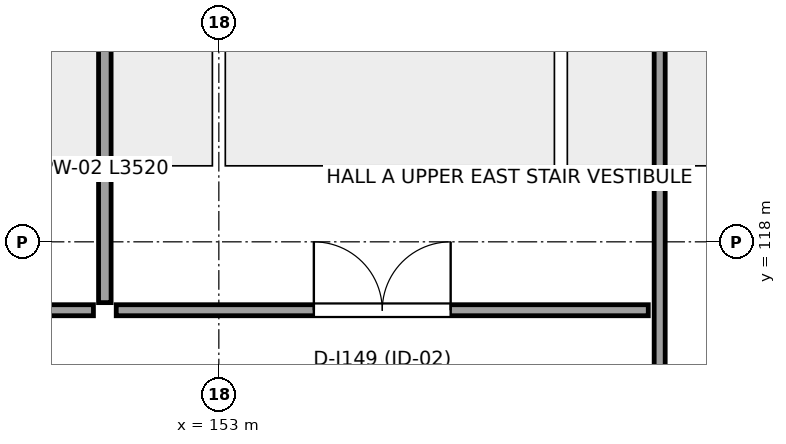
"""IFC4 building model, lengths in metres.
Left out: names, types, materials, properties, quantities, classifications, styles, units other than length and angle.
Written with IfcOpenShell. Run it as: python <this file> out.ifc"""

import sys

from ifc_helpers import new_model, si_unit, direction, frame, frame_2d, origin, place, context, subcontext, project, spatial, rectangle, extrude, element, fill, save


model = new_model("IFC4")
c1 = context("Model", 3, precision=1e-05, world=origin(), true_north=direction((0.0, 1.0)))
c2 = subcontext(c1, "Body", "Model", "MODEL_VIEW")
j1 = project(units=[si_unit("LENGTHUNIT", "METRE"), si_unit("PLANEANGLEUNIT", "RADIAN")], contexts=[c1])
p1 = place(None, origin())
s1 = spatial("IfcSite", under=j1, at=p1, CompositionType="ELEMENT")
p2 = place(p1, origin())
s2 = spatial("IfcBuilding", under=s1, at=p2, CompositionType="ELEMENT")
p3 = place(p2, frame((0.0, 0.0, 12.0)))
s3 = spatial("IfcBuildingStorey", under=s2, at=p3, CompositionType="ELEMENT", Elevation=12.0)
p4 = place(p3, frame((121.75, 117.1, 0.0), z_axis=(0.0, 0.0, 1.0), x_axis=(1.0, 0.0, 0.0)))
e1 = element("IfcWall", 1, at=p4, inside=s3, PredefinedType="PARTITIONING", context=c2, shape_type="SweptSolid", body=[
    extrude(rectangle(XDim=29.6, YDim=0.145, at=frame_2d((14.8, 0.0))), origin(), (0.0, 0.0, 1.0), 2.95),
])
p5 = place(p4, frame((2.5, 0.0, 0.0)))
e2 = element("IfcOpeningElement", 2, at=p5, cuts=e1, PredefinedType="OPENING", context=c2, shape_type="SweptSolid", body=[
    extrude(rectangle(XDim=0.98, YDim=2.15, at=frame_2d((0.49, 1.075))), frame((0.0, 0.083, 0.0), z_axis=(0.0, -1.0, 0.0), x_axis=(1.0, 0.0, 0.0)), (0.0, 0.0, 1.0), 0.165),
])
p6 = place(p3, frame((151.65, 117.1, 0.0), z_axis=(0.0, 0.0, 1.0), x_axis=(1.0, 0.0, 0.0)))
e3 = element("IfcWall", 3, at=p6, inside=s3, PredefinedType="PARTITIONING", context=c2, shape_type="SweptSolid", body=[
    extrude(rectangle(XDim=7.0, YDim=0.145, at=frame_2d((3.5, 0.0))), origin(), (0.0, 0.0, 1.0), 2.95),
])
p7 = place(p6, frame((2.6, 0.0, 0.0)))
e4 = element("IfcOpeningElement", 4, at=p7, cuts=e3, PredefinedType="OPENING", context=c2, shape_type="SweptSolid", body=[
    extrude(rectangle(XDim=1.8, YDim=2.3, at=frame_2d((0.9, 1.15))), frame((0.0, 0.083, 0.0), z_axis=(0.0, -1.0, 0.0), x_axis=(1.0, 0.0, 0.0)), (0.0, 0.0, 1.0), 0.165),
])
p8 = place(p3, frame((151.5, 117.2, 0.0), z_axis=(0.0, 0.0, 1.0), x_axis=(0.0, 1.0, 0.0)))
e5 = element("IfcWall", 5, at=p8, inside=s3, PredefinedType="PARTITIONING", context=c2, shape_type="SweptSolid", body=[
    extrude(rectangle(XDim=3.52, YDim=0.165, at=frame_2d((1.76, 0.0))), origin(), (0.0, 0.0, 1.0), 2.95),
])
p9 = place(p3, frame((158.8, 111.948, 0.0), z_axis=(0.0, 0.0, 1.0), x_axis=(0.0, 1.0, 0.0)))
e6 = element("IfcWall", 6, at=p9, inside=s3, PredefinedType="PARTITIONING", context=c2, shape_type="SweptSolid", body=[
    extrude(rectangle(XDim=8.704, YDim=0.145, at=frame_2d((4.352, 0.0))), origin(), (0.0, 0.0, 1.0), 2.95),
])
p10 = place(p7, origin())
e7 = element("IfcDoor", 7, at=p10, inside=s3, OperationType="DOUBLE_DOOR_SINGLE_SWING", PredefinedType="DOOR", context=c2, shape_type="SweptSolid", body=[
    extrude(rectangle(XDim=1.8, YDim=2.3, at=frame_2d((0.9, 1.15))), frame((0.0, 0.025, 0.0), z_axis=(0.0, -1.0, 0.0), x_axis=(1.0, 0.0, 0.0)), (0.0, 0.0, 1.0), 0.05),
])
fill(e4, e7)
save(model, sys.argv[1])
